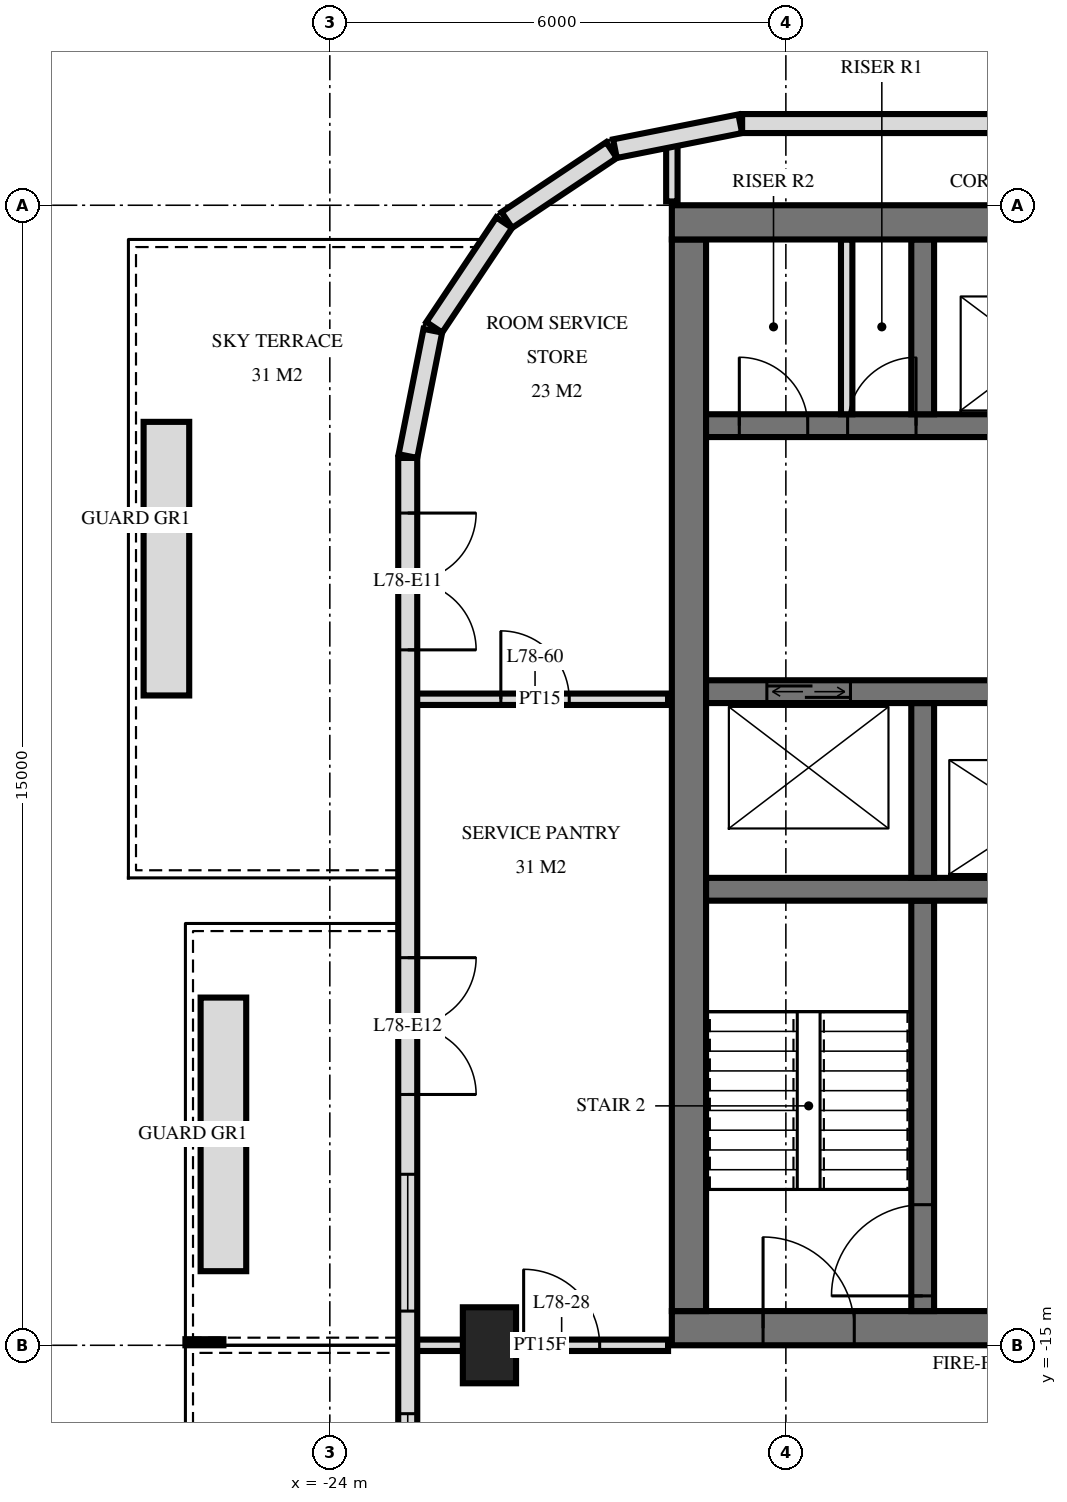
"""IFC4 building model, lengths in metres.
Left out: names, types, materials, properties, quantities, classifications, styles, units other than length and angle.
Written with IfcOpenShell. Run it as: python <this file> out.ifc"""

import sys

from ifc_helpers import new_model, si_unit, direction, frame, frame_2d, origin, origin_2d, place, context, subcontext, project, spatial, rectangle, extrude, element, fill, save


model = new_model("IFC4")
c1 = context("Model", 3, precision=1e-05, world=origin(), true_north=direction((0.0, 1.0)))
c2 = subcontext(c1, "Body", "Model", "MODEL_VIEW")
j1 = project(units=[si_unit("LENGTHUNIT", "METRE"), si_unit("PLANEANGLEUNIT", "RADIAN")], contexts=[c1])
p1 = place(None, origin())
s1 = spatial("IfcSite", under=j1, at=p1, CompositionType="ELEMENT")
p2 = place(p1, origin())
s2 = spatial("IfcBuilding", under=s1, at=p2, CompositionType="ELEMENT")
p3 = place(p2, frame((0.0, 0.0, 294.6)))
s3 = spatial("IfcBuildingStorey", under=s2, at=p3, CompositionType="ELEMENT", Elevation=294.6)
p4 = place(p3, frame((-21.9, -15.0, 0.0), z_axis=(0.0, 0.0, 1.0), x_axis=(0.0, 1.0, 0.0)))
e1 = element("IfcColumn", 1, at=p4, inside=s3, PredefinedType="COLUMN", context=c2, shape_type="SweptSolid", body=[
    extrude(rectangle(XDim=1.0, YDim=0.7, at=origin_2d()), origin(), (0.0, 0.0, 1.0), 3.5),
])
p5 = place(p3, frame((-19.5, -0.225, 0.0), z_axis=(0.0, 0.0, 1.0), x_axis=(1.0, 0.0, 0.0)))
e2 = element("IfcWall", 2, at=p5, inside=s3, PredefinedType="SHEAR", context=c2, shape_type="SweptSolid", body=[
    extrude(rectangle(XDim=9.5, YDim=0.45, at=frame_2d((4.75, 0.0))), origin(), (0.0, 0.0, 1.0), 3.5),
])
p6 = place(p3, frame((-19.5, -14.775, 0.0), z_axis=(0.0, 0.0, 1.0), x_axis=(1.0, 0.0, 0.0)))
e3 = element("IfcWall", 3, at=p6, inside=s3, PredefinedType="SHEAR", context=c2, shape_type="SweptSolid", body=[
    extrude(rectangle(XDim=9.5, YDim=0.45, at=frame_2d((4.75, 0.0))), origin(), (0.0, 0.0, 1.0), 3.5),
])
p7 = place(p6, frame((1.2, 0.0, 0.0)))
e4 = element("IfcOpeningElement", 4, at=p7, cuts=e3, PredefinedType="OPENING", context=c2, shape_type="SweptSolid", body=[
    extrude(rectangle(XDim=1.2, YDim=2.1, at=frame_2d((0.6, 1.05))), frame((0.0, 0.235, 0.0), z_axis=(0.0, -1.0, 0.0), x_axis=(1.0, 0.0, 0.0)), (0.0, 0.0, 1.0), 0.47),
])
p8 = place(p6, frame((4.25, 0.0, 0.0)))
e5 = element("IfcOpeningElement", 5, at=p8, cuts=e3, PredefinedType="OPENING", context=c2, shape_type="SweptSolid", body=[
    extrude(rectangle(XDim=1.1, YDim=2.1, at=frame_2d((0.55, 1.05))), frame((0.0, 0.235, 0.0), z_axis=(0.0, -1.0, 0.0), x_axis=(1.0, 0.0, 0.0)), (0.0, 0.0, 1.0), 0.47),
])
p9 = place(p3, frame((-19.275, -14.55, 0.0), z_axis=(0.0, 0.0, 1.0), x_axis=(0.0, 1.0, 0.0)))
e6 = element("IfcWall", 6, at=p9, inside=s3, PredefinedType="SHEAR", context=c2, shape_type="SweptSolid", body=[
    extrude(rectangle(XDim=14.1, YDim=0.45, at=frame_2d((7.05, 0.0))), origin(), (0.0, 0.0, 1.0), 3.5),
])
p10 = place(p3, frame((-19.05, -2.9, 0.0), z_axis=(0.0, 0.0, 1.0), x_axis=(1.0, 0.0, 0.0)))
e7 = element("IfcWall", 7, at=p10, inside=s3, PredefinedType="SHEAR", context=c2, shape_type="SweptSolid", body=[
    extrude(rectangle(XDim=8.7, YDim=0.3, at=frame_2d((4.35, 0.0))), origin(), (0.0, 0.0, 1.0), 3.5),
])
p11 = place(p10, frame((6.8, 0.0, 0.0)))
e8 = element("IfcOpeningElement", 8, at=p11, cuts=e7, PredefinedType="OPENING", context=c2, shape_type="SweptSolid", body=[
    extrude(rectangle(XDim=1.1, YDim=2.1, at=frame_2d((0.55, 1.05))), frame((0.0, 0.16, 0.0), z_axis=(0.0, -1.0, 0.0), x_axis=(1.0, 0.0, 0.0)), (0.0, 0.0, 1.0), 0.32),
])
p12 = place(p10, frame((3.8, 0.0, 0.0)))
e9 = element("IfcOpeningElement", 9, at=p12, cuts=e7, PredefinedType="OPENING", context=c2, shape_type="SweptSolid", body=[
    extrude(rectangle(XDim=1.1, YDim=2.1, at=frame_2d((0.55, 1.05))), frame((0.0, 0.16, 0.0), z_axis=(0.0, -1.0, 0.0), x_axis=(1.0, 0.0, 0.0)), (0.0, 0.0, 1.0), 0.32),
])
p13 = place(p10, frame((1.863, 0.0, 0.0)))
e10 = element("IfcOpeningElement", 10, at=p13, cuts=e7, PredefinedType="OPENING", context=c2, shape_type="SweptSolid", body=[
    extrude(rectangle(XDim=0.9, YDim=2.1, at=frame_2d((0.45, 1.05))), frame((0.0, 0.16, 0.0), z_axis=(0.0, -1.0, 0.0), x_axis=(1.0, 0.0, 0.0)), (0.0, 0.0, 1.0), 0.32),
])
p14 = place(p10, frame((0.438, 0.0, 0.0)))
e11 = element("IfcOpeningElement", 11, at=p14, cuts=e7, PredefinedType="OPENING", context=c2, shape_type="SweptSolid", body=[
    extrude(rectangle(XDim=0.9, YDim=2.1, at=frame_2d((0.45, 1.05))), frame((0.0, 0.16, 0.0), z_axis=(0.0, -1.0, 0.0), x_axis=(1.0, 0.0, 0.0)), (0.0, 0.0, 1.0), 0.32),
])
p15 = place(p3, frame((-19.05, -6.4, 0.0), z_axis=(0.0, 0.0, 1.0), x_axis=(1.0, 0.0, 0.0)))
e12 = element("IfcWall", 12, at=p15, inside=s3, PredefinedType="SHEAR", context=c2, shape_type="SweptSolid", body=[
    extrude(rectangle(XDim=8.7, YDim=0.3, at=frame_2d((4.35, 0.0))), origin(), (0.0, 0.0, 1.0), 3.5),
])
p16 = place(p15, frame((0.8, 0.0, 0.0)))
e13 = element("IfcOpeningElement", 13, at=p16, cuts=e12, PredefinedType="OPENING", context=c2, shape_type="SweptSolid", body=[
    extrude(rectangle(XDim=1.1, YDim=2.1, at=frame_2d((0.55, 1.05))), frame((0.0, 0.16, 0.0), z_axis=(0.0, -1.0, 0.0), x_axis=(1.0, 0.0, 0.0)), (0.0, 0.0, 1.0), 0.32),
])
p17 = place(p3, frame((-19.05, -9.0, 0.0), z_axis=(0.0, 0.0, 1.0), x_axis=(1.0, 0.0, 0.0)))
e14 = element("IfcWall", 14, at=p17, inside=s3, PredefinedType="SHEAR", context=c2, shape_type="SweptSolid", body=[
    extrude(rectangle(XDim=8.7, YDim=0.3, at=frame_2d((4.35, 0.0))), origin(), (0.0, 0.0, 1.0), 3.5),
])
p18 = place(p17, frame((3.8, 0.0, 0.0)))
e15 = element("IfcOpeningElement", 15, at=p18, cuts=e14, PredefinedType="OPENING", context=c2, shape_type="SweptSolid", body=[
    extrude(rectangle(XDim=1.1, YDim=2.1, at=frame_2d((0.55, 1.05))), frame((0.0, 0.16, 0.0), z_axis=(0.0, -1.0, 0.0), x_axis=(1.0, 0.0, 0.0)), (0.0, 0.0, 1.0), 0.32),
])
for number, where, z_axis, x_axis in (
    (16, (-16.2, -2.75, 0.0), (0.0, 0.0, 1.0), (0.0, 1.0, 0.0)),
    (17, (-16.2, -8.85, 0.0), (0.0, 0.0, 1.0), (0.0, 1.0, 0.0)),
):
    element("IfcWall", number, at=place(p3, frame(where, z_axis=z_axis, x_axis=x_axis)), inside=s3, PredefinedType="SHEAR", context=c2, shape_type="SweptSolid", body=[
        extrude(rectangle(XDim=2.3, YDim=0.3, at=frame_2d((1.15, 0.0))), origin(), (0.0, 0.0, 1.0), 3.5),
    ])
p19 = place(p3, frame((-16.2, -14.55, 0.0), z_axis=(0.0, 0.0, 1.0), x_axis=(0.0, 1.0, 0.0)))
e18 = element("IfcWall", 18, at=p19, inside=s3, PredefinedType="SHEAR", context=c2, shape_type="SweptSolid", body=[
    extrude(rectangle(XDim=5.4, YDim=0.3, at=frame_2d((2.7, 0.0))), origin(), (0.0, 0.0, 1.0), 3.5),
])
p20 = place(p19, frame((0.2, 0.0, 0.0)))
e19 = element("IfcOpeningElement", 19, at=p20, cuts=e18, PredefinedType="OPENING", context=c2, shape_type="SweptSolid", body=[
    extrude(rectangle(XDim=1.2, YDim=2.1, at=frame_2d((0.6, 1.05))), frame((0.0, 0.16, 0.0), z_axis=(0.0, -1.0, 0.0), x_axis=(1.0, 0.0, 0.0)), (0.0, 0.0, 1.0), 0.32),
])
p21 = place(p3, frame((18.575, 1.075, 0.0), z_axis=(0.0, 0.0, 1.0), x_axis=(-1.0, 0.0, 0.0)))
e20 = element("IfcWall", 20, at=p21, inside=s3, PredefinedType="SOLIDWALL", context=c2, shape_type="SweptSolid", body=[
    extrude(rectangle(XDim=37.151, YDim=0.25, at=frame_2d((18.575, 0.0))), origin(), (0.0, 0.0, 1.0), 3.22),
])
p22 = place(p21, frame((9.275, 0.0, 0.9)))
e21 = element("IfcOpeningElement", 21, at=p22, cuts=e20, PredefinedType="OPENING", context=c2, shape_type="SweptSolid", body=[
    extrude(rectangle(XDim=2.4, YDim=1.5, at=frame_2d((1.2, 0.75))), frame((0.0, 0.135, 0.0), z_axis=(0.0, -1.0, 0.0), x_axis=(1.0, 0.0, 0.0)), (0.0, 0.0, 1.0), 0.27),
])
p23 = place(p21, frame((12.275, 0.0, 0.9)))
e22 = element("IfcOpeningElement", 22, at=p23, cuts=e20, PredefinedType="OPENING", context=c2, shape_type="SweptSolid", body=[
    extrude(rectangle(XDim=2.4, YDim=1.5, at=frame_2d((1.2, 0.75))), frame((0.0, 0.135, 0.0), z_axis=(0.0, -1.0, 0.0), x_axis=(1.0, 0.0, 0.0)), (0.0, 0.0, 1.0), 0.27),
])
p24 = place(p21, frame((15.275, 0.0, 0.9)))
e23 = element("IfcOpeningElement", 23, at=p24, cuts=e20, PredefinedType="OPENING", context=c2, shape_type="SweptSolid", body=[
    extrude(rectangle(XDim=2.4, YDim=1.5, at=frame_2d((1.2, 0.75))), frame((0.0, 0.135, 0.0), z_axis=(0.0, -1.0, 0.0), x_axis=(1.0, 0.0, 0.0)), (0.0, 0.0, 1.0), 0.27),
])
p25 = place(p21, frame((25.375, 0.0, 0.9)))
e24 = element("IfcOpeningElement", 24, at=p25, cuts=e20, PredefinedType="OPENING", context=c2, shape_type="SweptSolid", body=[
    extrude(rectangle(XDim=2.4, YDim=1.5, at=frame_2d((1.2, 0.75))), frame((0.0, 0.135, 0.0), z_axis=(0.0, -1.0, 0.0), x_axis=(1.0, 0.0, 0.0)), (0.0, 0.0, 1.0), 0.27),
])
p26 = place(p3, frame((-18.6, 1.073, 0.0), z_axis=(0.0, 0.0, 1.0), x_axis=(-0.980797896849, -0.195026884138, 0.0)))
e25 = element("IfcWall", 25, at=p26, inside=s3, PredefinedType="SOLIDWALL", context=c2, shape_type="SweptSolid", body=[
    extrude(rectangle(XDim=1.681, YDim=0.25, at=frame_2d((0.841, 0.0))), origin(), (0.0, 0.0, 1.0), 3.22),
])
for number, where, z_axis, x_axis in (
    (26, (-20.294, 0.726, 0.0), (0.0, 0.0, 1.0), (-0.831, -0.556, 0.0)),
    (27, (-21.706, -0.229, 0.0), (0.0, 0.0, 1.0), (-0.556, -0.831, 0.0)),
):
    element("IfcWall", number, at=place(p3, frame(where, z_axis=z_axis, x_axis=x_axis)), inside=s3, PredefinedType="SOLIDWALL", context=c2, shape_type="SweptSolid", body=[
        extrude(rectangle(XDim=1.656, YDim=0.25, at=frame_2d((0.828, 0.0))), origin(), (0.0, 0.0, 1.0), 3.22),
    ])
p27 = place(p3, frame((-22.645, -1.651, 0.0), z_axis=(0.0, 0.0, 1.0), x_axis=(-0.19513878023, -0.980775640221, 0.0)))
e28 = element("IfcWall", 28, at=p27, inside=s3, PredefinedType="SOLIDWALL", context=c2, shape_type="SweptSolid", body=[
    extrude(rectangle(XDim=1.681, YDim=0.25, at=frame_2d((0.841, 0.0))), origin(), (0.0, 0.0, 1.0), 3.22),
])
p28 = place(p3, frame((-22.975, -3.325, 0.0), z_axis=(0.0, 0.0, 1.0), x_axis=(0.0, -1.0, 0.0)))
e29 = element("IfcWall", 29, at=p28, inside=s3, PredefinedType="SOLIDWALL", context=c2, shape_type="SweptSolid", body=[
    extrude(rectangle(XDim=25.951, YDim=0.25, at=frame_2d((12.975, 0.0))), origin(), (0.0, 0.0, 1.0), 3.22),
])
p29 = place(p28, frame((0.725, 0.0, 0.0)))
e30 = element("IfcOpeningElement", 30, at=p29, cuts=e29, PredefinedType="OPENING", context=c2, shape_type="SweptSolid", body=[
    extrude(rectangle(XDim=1.8, YDim=2.4, at=frame_2d((0.9, 1.2))), frame((0.0, 0.135, 0.0), z_axis=(0.0, -1.0, 0.0), x_axis=(1.0, 0.0, 0.0)), (0.0, 0.0, 1.0), 0.27),
])
p30 = place(p28, frame((6.575, 0.0, 0.0)))
e31 = element("IfcOpeningElement", 31, at=p30, cuts=e29, PredefinedType="OPENING", context=c2, shape_type="SweptSolid", body=[
    extrude(rectangle(XDim=1.8, YDim=2.4, at=frame_2d((0.9, 1.2))), frame((0.0, 0.135, 0.0), z_axis=(0.0, -1.0, 0.0), x_axis=(1.0, 0.0, 0.0)), (0.0, 0.0, 1.0), 0.27),
])
p31 = place(p28, frame((9.425, 0.0, 0.9)))
e32 = element("IfcOpeningElement", 32, at=p31, cuts=e29, PredefinedType="OPENING", context=c2, shape_type="SweptSolid", body=[
    extrude(rectangle(XDim=1.8, YDim=1.5, at=frame_2d((0.9, 0.75))), frame((0.0, 0.135, 0.0), z_axis=(0.0, -1.0, 0.0), x_axis=(1.0, 0.0, 0.0)), (0.0, 0.0, 1.0), 0.27),
])
p32 = place(p28, frame((12.575, 0.0, 0.9)))
e33 = element("IfcOpeningElement", 33, at=p32, cuts=e29, PredefinedType="OPENING", context=c2, shape_type="SweptSolid", body=[
    extrude(rectangle(XDim=1.2, YDim=1.5, at=frame_2d((0.6, 0.75))), frame((0.0, 0.135, 0.0), z_axis=(0.0, -1.0, 0.0), x_axis=(1.0, 0.0, 0.0)), (0.0, 0.0, 1.0), 0.27),
])
p33 = place(p28, frame((18.175, 0.0, 0.0)))
e34 = element("IfcOpeningElement", 34, at=p33, cuts=e29, PredefinedType="OPENING", context=c2, shape_type="SweptSolid", body=[
    extrude(rectangle(XDim=1.8, YDim=2.4, at=frame_2d((0.9, 1.2))), frame((0.0, 0.135, 0.0), z_axis=(0.0, -1.0, 0.0), x_axis=(1.0, 0.0, 0.0)), (0.0, 0.0, 1.0), 0.27),
])
p34 = place(p28, frame((21.075, 0.0, 0.0)))
e35 = element("IfcOpeningElement", 35, at=p34, cuts=e29, PredefinedType="OPENING", context=c2, shape_type="SweptSolid", body=[
    extrude(rectangle(XDim=1.8, YDim=2.4, at=frame_2d((0.9, 1.2))), frame((0.0, 0.135, 0.0), z_axis=(0.0, -1.0, 0.0), x_axis=(1.0, 0.0, 0.0)), (0.0, 0.0, 1.0), 0.27),
])
p35 = place(p28, frame((23.825, 0.0, 0.9)))
e36 = element("IfcOpeningElement", 36, at=p35, cuts=e29, PredefinedType="OPENING", context=c2, shape_type="SweptSolid", body=[
    extrude(rectangle(XDim=1.8, YDim=1.5, at=frame_2d((0.9, 0.75))), frame((0.0, 0.135, 0.0), z_axis=(0.0, -1.0, 0.0), x_axis=(1.0, 0.0, 0.0)), (0.0, 0.0, 1.0), 0.27),
])
for number, where, z_axis, x_axis in (
    (37, (-25.4, -14.025, 0.0), (0.0, 0.0, 1.0), (0.0, 1.0, 0.0)),
    (38, (-26.15, -6.45, 0.0), (0.0, 0.0, 1.0), (0.0, 1.0, 0.0)),
):
    element("IfcWall", number, at=place(p3, frame(where, z_axis=z_axis, x_axis=x_axis)), inside=s3, PredefinedType="USERDEFINED", context=c2, shape_type="SweptSolid", body=[
        extrude(rectangle(XDim=3.6, YDim=0.6, at=frame_2d((1.8, 0.0))), origin(), (0.0, 0.0, 1.0), 0.65),
    ])
p36 = place(p3, frame((-17.2, -2.75, 0.0), z_axis=(0.0, 0.0, 1.0), x_axis=(0.0, 1.0, 0.0)))
e39 = element("IfcWall", 39, at=p36, inside=s3, PredefinedType="PARTITIONING", context=c2, shape_type="SweptSolid", body=[
    extrude(rectangle(XDim=2.3, YDim=0.15, at=frame_2d((1.15, 0.0))), origin(), (0.0, 0.0, 1.0), 3.2),
])
p37 = place(p3, frame((-19.5, 0.05, 0.0), z_axis=(0.0, 0.0, 1.0), x_axis=(0.0, 1.0, 0.0)))
e40 = element("IfcWall", 40, at=p37, inside=s3, PredefinedType="PARTITIONING", context=c2, shape_type="SweptSolid", body=[
    extrude(rectangle(XDim=0.787, YDim=0.15, at=frame_2d((0.394, 0.0))), origin(), (0.0, 0.0, 1.0), 3.22),
])
p38 = place(p3, frame((-22.92, -15.0, 0.0), z_axis=(0.0, 0.0, 1.0), x_axis=(1.0, 0.0, 0.0)))
e41 = element("IfcWall", 41, at=p38, inside=s3, PredefinedType="PARTITIONING", context=c2, shape_type="SweptSolid", body=[
    extrude(rectangle(XDim=3.37, YDim=0.15, at=frame_2d((1.685, 0.0))), origin(), (0.0, 0.0, 1.0), 3.22),
])
p39 = place(p38, frame((1.47, 0.0, 0.0)))
e42 = element("IfcOpeningElement", 42, at=p39, cuts=e41, PredefinedType="OPENING", context=c2, shape_type="SweptSolid", body=[
    extrude(rectangle(XDim=1.0, YDim=2.1, at=frame_2d((0.5, 1.05))), frame((0.0, 0.085, 0.0), z_axis=(0.0, -1.0, 0.0), x_axis=(1.0, 0.0, 0.0)), (0.0, 0.0, 1.0), 0.17),
])
p40 = place(p3, frame((-22.92, -6.5, 0.0), z_axis=(0.0, 0.0, 1.0), x_axis=(1.0, 0.0, 0.0)))
e43 = element("IfcWall", 43, at=p40, inside=s3, PredefinedType="PARTITIONING", context=c2, shape_type="SweptSolid", body=[
    extrude(rectangle(XDim=3.37, YDim=0.15, at=frame_2d((1.685, 0.0))), origin(), (0.0, 0.0, 1.0), 3.22),
])
p41 = place(p40, frame((1.17, 0.0, 0.0)))
e44 = element("IfcOpeningElement", 44, at=p41, cuts=e43, PredefinedType="OPENING", context=c2, shape_type="SweptSolid", body=[
    extrude(rectangle(XDim=0.9, YDim=2.1, at=frame_2d((0.45, 1.05))), frame((0.0, 0.085, 0.0), z_axis=(0.0, -1.0, 0.0), x_axis=(1.0, 0.0, 0.0)), (0.0, 0.0, 1.0), 0.17),
])
p42 = place(p29, origin())
e45 = element("IfcDoor", 45, at=p42, inside=s3, OperationType="DOUBLE_DOOR_SINGLE_SWING", PredefinedType="DOOR", context=c2, shape_type="SweptSolid", body=[
    extrude(rectangle(XDim=1.8, YDim=2.4, at=frame_2d((0.9, 1.2))), frame((0.0, 0.025, 0.0), z_axis=(0.0, -1.0, 0.0), x_axis=(1.0, 0.0, 0.0)), (0.0, 0.0, 1.0), 0.05),
])
fill(e30, e45)
p43 = place(p30, origin())
e46 = element("IfcDoor", 46, at=p43, inside=s3, OperationType="DOUBLE_DOOR_SINGLE_SWING", PredefinedType="DOOR", context=c2, shape_type="SweptSolid", body=[
    extrude(rectangle(XDim=1.8, YDim=2.4, at=frame_2d((0.9, 1.2))), frame((0.0, 0.025, 0.0), z_axis=(0.0, -1.0, 0.0), x_axis=(1.0, 0.0, 0.0)), (0.0, 0.0, 1.0), 0.05),
])
fill(e31, e46)
p44 = place(p31, origin())
e47 = element("IfcWindow", 47, at=p44, inside=s3, PartitioningType="SINGLE_PANEL", PredefinedType="WINDOW", context=c2, shape_type="SweptSolid", body=[
    extrude(rectangle(XDim=1.8, YDim=1.5, at=frame_2d((0.9, 0.75))), frame((0.0, 0.03, 0.0), z_axis=(0.0, -1.0, 0.0), x_axis=(1.0, 0.0, 0.0)), (0.0, 0.0, 1.0), 0.06),
])
fill(e32, e47)
p45 = place(p32, origin())
e48 = element("IfcWindow", 48, at=p45, inside=s3, PartitioningType="SINGLE_PANEL", PredefinedType="WINDOW", context=c2, shape_type="SweptSolid", body=[
    extrude(rectangle(XDim=1.2, YDim=1.5, at=frame_2d((0.6, 0.75))), frame((0.0, 0.03, 0.0), z_axis=(0.0, -1.0, 0.0), x_axis=(1.0, 0.0, 0.0)), (0.0, 0.0, 1.0), 0.06),
])
fill(e33, e48)
p46 = place(p16, origin())
e49 = element("IfcDoor", 49, at=p46, inside=s3, OperationType="DOUBLE_DOOR_SLIDING", PredefinedType="USERDEFINED", context=c2, shape_type="SweptSolid", body=[
    extrude(rectangle(XDim=1.1, YDim=2.1, at=frame_2d((0.55, 1.05))), frame((0.0, 0.025, 0.0), z_axis=(0.0, -1.0, 0.0), x_axis=(1.0, 0.0, 0.0)), (0.0, 0.0, 1.0), 0.05),
])
fill(e13, e49)
p47 = place(p7, origin())
e50 = element("IfcDoor", 50, at=p47, inside=s3, OperationType="SINGLE_SWING_RIGHT", PredefinedType="DOOR", context=c2, shape_type="SweptSolid", body=[
    extrude(rectangle(XDim=1.2, YDim=2.1, at=frame_2d((0.6, 1.05))), frame((0.0, 0.025, 0.0), z_axis=(0.0, -1.0, 0.0), x_axis=(1.0, 0.0, 0.0)), (0.0, 0.0, 1.0), 0.05),
])
fill(e4, e50)
p48 = place(p13, origin())
e51 = element("IfcDoor", 51, at=p48, inside=s3, OperationType="SINGLE_SWING_LEFT", PredefinedType="DOOR", context=c2, shape_type="SweptSolid", body=[
    extrude(rectangle(XDim=0.9, YDim=2.1, at=frame_2d((0.45, 1.05))), frame((0.0, 0.025, 0.0), z_axis=(0.0, -1.0, 0.0), x_axis=(1.0, 0.0, 0.0)), (0.0, 0.0, 1.0), 0.05),
])
fill(e10, e51)
p49 = place(p14, origin())
e52 = element("IfcDoor", 52, at=p49, inside=s3, OperationType="SINGLE_SWING_RIGHT", PredefinedType="DOOR", context=c2, shape_type="SweptSolid", body=[
    extrude(rectangle(XDim=0.9, YDim=2.1, at=frame_2d((0.45, 1.05))), frame((0.0, 0.025, 0.0), z_axis=(0.0, -1.0, 0.0), x_axis=(1.0, 0.0, 0.0)), (0.0, 0.0, 1.0), 0.05),
])
fill(e11, e52)
p50 = place(p20, origin())
e53 = element("IfcDoor", 53, at=p50, inside=s3, OperationType="SINGLE_SWING_RIGHT", PredefinedType="DOOR", context=c2, shape_type="SweptSolid", body=[
    extrude(rectangle(XDim=1.2, YDim=2.1, at=frame_2d((0.6, 1.05))), frame((0.0, 0.025, 0.0), z_axis=(0.0, -1.0, 0.0), x_axis=(1.0, 0.0, 0.0)), (0.0, 0.0, 1.0), 0.05),
])
fill(e19, e53)
p51 = place(p39, origin())
e54 = element("IfcDoor", 54, at=p51, inside=s3, OperationType="SINGLE_SWING_RIGHT", PredefinedType="DOOR", context=c2, shape_type="SweptSolid", body=[
    extrude(rectangle(XDim=1.0, YDim=2.1, at=frame_2d((0.5, 1.05))), frame((0.0, 0.025, 0.0), z_axis=(0.0, -1.0, 0.0), x_axis=(1.0, 0.0, 0.0)), (0.0, 0.0, 1.0), 0.05),
])
fill(e42, e54)
p52 = place(p41, origin())
e55 = element("IfcDoor", 55, at=p52, inside=s3, OperationType="SINGLE_SWING_RIGHT", PredefinedType="DOOR", context=c2, shape_type="SweptSolid", body=[
    extrude(rectangle(XDim=0.9, YDim=2.1, at=frame_2d((0.45, 1.05))), frame((0.0, 0.025, 0.0), z_axis=(0.0, -1.0, 0.0), x_axis=(1.0, 0.0, 0.0)), (0.0, 0.0, 1.0), 0.05),
])
fill(e44, e55)
save(model, sys.argv[1])
